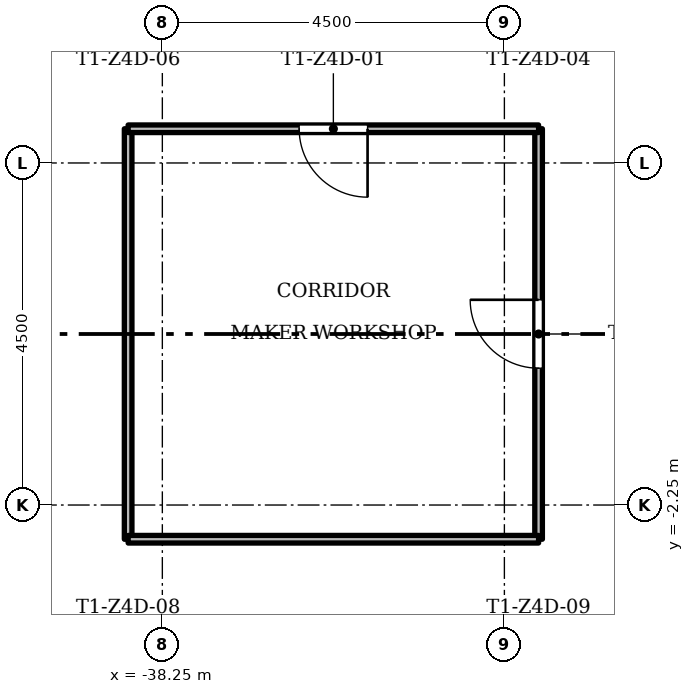
"""IFC4 building model, lengths in metres.
Left out: names, types, materials, properties, quantities, classifications, styles, units other than length and angle.
Written with IfcOpenShell. Run it as: python <this file> out.ifc"""

import sys

from ifc_helpers import new_model, si_unit, direction, frame, frame_2d, origin, place, context, subcontext, project, spatial, rectangle, extrude, element, fill, save


model = new_model("IFC4")
c1 = context("Model", 3, precision=1e-05, world=origin(), true_north=direction((0.0, 1.0)))
c2 = subcontext(c1, "Body", "Model", "MODEL_VIEW")
j1 = project(units=[si_unit("LENGTHUNIT", "METRE"), si_unit("PLANEANGLEUNIT", "RADIAN")], contexts=[c1])
p1 = place(None, origin())
s1 = spatial("IfcSite", under=j1, at=p1, CompositionType="ELEMENT")
p2 = place(p1, origin())
s2 = spatial("IfcBuilding", under=s1, at=p2, CompositionType="ELEMENT")
p3 = place(p2, frame((0.0, 0.0, 202.8)))
s3 = spatial("IfcBuildingStorey", under=s2, at=p3, CompositionType="ELEMENT", Elevation=202.8)
p4 = place(p3, frame((-38.7, -2.7, 0.0), z_axis=(0.0, 0.0, 1.0), x_axis=(0.0, 1.0, 0.0)))
e1 = element("IfcWall", 1, at=p4, inside=s3, PredefinedType="PARTITIONING", context=c2, shape_type="SweptSolid", body=[
    extrude(rectangle(XDim=5.4, YDim=0.1, at=frame_2d((2.7, 0.0))), origin(), (0.0, 0.0, 1.0), 3.0),
])
p5 = place(p3, frame((-33.3, -2.7, 0.0), z_axis=(0.0, 0.0, 1.0), x_axis=(0.0, 1.0, 0.0)))
e2 = element("IfcWall", 2, at=p5, inside=s3, PredefinedType="PARTITIONING", context=c2, shape_type="SweptSolid", body=[
    extrude(rectangle(XDim=5.4, YDim=0.1, at=frame_2d((2.7, 0.0))), origin(), (0.0, 0.0, 1.0), 3.0),
])
p6 = place(p5, frame((2.25, 0.0, 0.0)))
e3 = element("IfcOpeningElement", 3, at=p6, cuts=e2, PredefinedType="OPENING", context=c2, shape_type="SweptSolid", body=[
    extrude(rectangle(XDim=0.9, YDim=2.1, at=frame_2d((0.45, 1.05))), frame((0.0, 0.06, 0.0), z_axis=(0.0, -1.0, 0.0), x_axis=(1.0, 0.0, 0.0)), (0.0, 0.0, 1.0), 0.12),
])
p7 = place(p3, frame((-38.7, -2.7, 0.0), z_axis=(0.0, 0.0, 1.0), x_axis=(1.0, 0.0, 0.0)))
e4 = element("IfcWall", 4, at=p7, inside=s3, PredefinedType="PARTITIONING", context=c2, shape_type="SweptSolid", body=[
    extrude(rectangle(XDim=5.4, YDim=0.1, at=frame_2d((2.7, 0.0))), origin(), (0.0, 0.0, 1.0), 3.0),
])
p8 = place(p3, frame((-38.7, 2.7, 0.0), z_axis=(0.0, 0.0, 1.0), x_axis=(1.0, 0.0, 0.0)))
e5 = element("IfcWall", 5, at=p8, inside=s3, PredefinedType="PARTITIONING", context=c2, shape_type="SweptSolid", body=[
    extrude(rectangle(XDim=5.4, YDim=0.1, at=frame_2d((2.7, 0.0))), origin(), (0.0, 0.0, 1.0), 3.0),
])
p9 = place(p8, frame((2.25, 0.0, 0.0)))
e6 = element("IfcOpeningElement", 6, at=p9, cuts=e5, PredefinedType="OPENING", context=c2, shape_type="SweptSolid", body=[
    extrude(rectangle(XDim=0.9, YDim=2.1, at=frame_2d((0.45, 1.05))), frame((0.0, 0.06, 0.0), z_axis=(0.0, -1.0, 0.0), x_axis=(1.0, 0.0, 0.0)), (0.0, 0.0, 1.0), 0.12),
])
p10 = place(p9, origin())
e7 = element("IfcDoor", 7, at=p10, inside=s3, OperationType="SINGLE_SWING_RIGHT", PredefinedType="DOOR", context=c2, shape_type="SweptSolid", body=[
    extrude(rectangle(XDim=0.9, YDim=2.1, at=frame_2d((0.45, 1.05))), frame((0.0, 0.025, 0.0), z_axis=(0.0, -1.0, 0.0), x_axis=(1.0, 0.0, 0.0)), (0.0, 0.0, 1.0), 0.05),
])
fill(e6, e7)
p11 = place(p6, origin())
e8 = element("IfcDoor", 8, at=p11, inside=s3, OperationType="SINGLE_SWING_LEFT", PredefinedType="DOOR", context=c2, shape_type="SweptSolid", body=[
    extrude(rectangle(XDim=0.9, YDim=2.1, at=frame_2d((0.45, 1.05))), frame((0.0, 0.025, 0.0), z_axis=(0.0, -1.0, 0.0), x_axis=(1.0, 0.0, 0.0)), (0.0, 0.0, 1.0), 0.05),
])
fill(e3, e8)
save(model, sys.argv[1])
